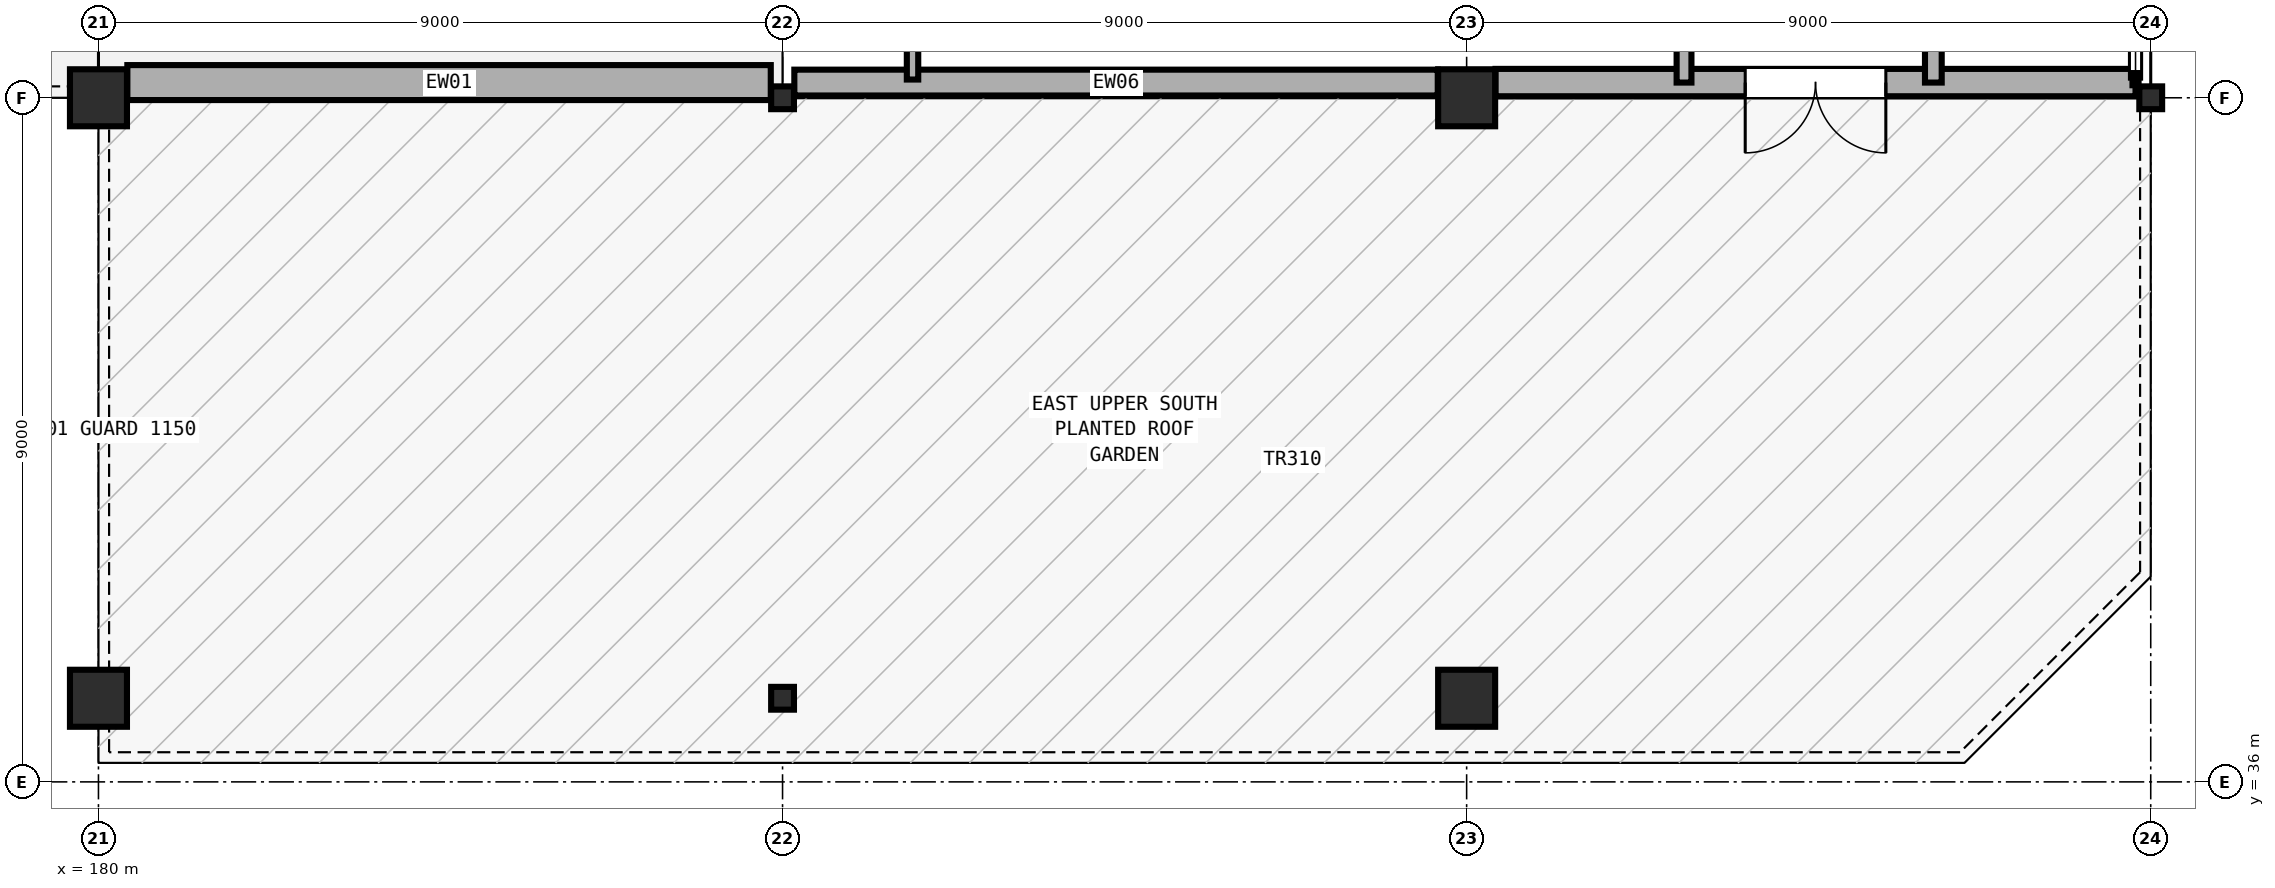
"""IFC4 building model, lengths in metres.
Left out: names, types, materials, properties, quantities, classifications, styles, units other than length and angle.
Written with IfcOpenShell. Run it as: python <this file> out.ifc"""

import sys

from ifc_helpers import new_model, si_unit, direction, frame, frame_2d, origin, origin_2d, place, context, subcontext, project, spatial, rectangle, hollow_rectangle, extrude, element, fill, save


model = new_model("IFC4")
c1 = context("Model", 3, precision=1e-05, world=origin(), true_north=direction((0.0, 1.0)))
c2 = subcontext(c1, "Body", "Model", "MODEL_VIEW")
j1 = project(units=[si_unit("LENGTHUNIT", "METRE"), si_unit("PLANEANGLEUNIT", "RADIAN")], contexts=[c1])
p1 = place(None, origin())
s1 = spatial("IfcSite", under=j1, at=p1, CompositionType="ELEMENT")
p2 = place(p1, origin())
s2 = spatial("IfcBuilding", under=s1, at=p2, CompositionType="ELEMENT")
p3 = place(p2, frame((0.0, 0.0, 19.2)))
s3 = spatial("IfcBuildingStorey", under=s2, at=p3, CompositionType="ELEMENT", Elevation=19.2)
for number, where, z_axis, x_axis in (
    (1, (180.0, 37.1, 0.0), (0.0, 0.0, 1.0), (1.0, 0.0, 0.0)),
    (2, (180.0, 45.0, 0.0), (0.0, 0.0, 1.0), (1.0, 0.0, 0.0)),
):
    element("IfcColumn", number, at=place(p3, frame(where, z_axis=z_axis, x_axis=x_axis)), inside=s3, PredefinedType="COLUMN", context=c2, shape_type="SweptSolid", body=[
        extrude(rectangle(XDim=0.75, YDim=0.75, at=origin_2d()), origin(), (0.0, 0.0, 1.0), 4.8),
    ])
for number, where, z_axis, x_axis in (
    (3, (189.0, 37.1, 0.0), (0.0, 0.0, 1.0), (1.0, 0.0, 0.0)),
    (4, (189.0, 45.0, 0.0), (0.0, 0.0, 1.0), (1.0, 0.0, 0.0)),
):
    element("IfcColumn", number, at=place(p3, frame(where, z_axis=z_axis, x_axis=x_axis)), inside=s3, PredefinedType="COLUMN", context=c2, shape_type="SweptSolid", body=[
        extrude(hollow_rectangle(XDim=0.3, YDim=0.3, WallThickness=0.012, at=origin_2d()), origin(), (0.0, 0.0, 1.0), 4.8),
    ])
for number, where, z_axis, x_axis in (
    (5, (198.0, 37.1, 0.0), (0.0, 0.0, 1.0), (1.0, 0.0, 0.0)),
    (6, (198.0, 45.0, 0.0), (0.0, 0.0, 1.0), (1.0, 0.0, 0.0)),
):
    element("IfcColumn", number, at=place(p3, frame(where, z_axis=z_axis, x_axis=x_axis)), inside=s3, PredefinedType="COLUMN", context=c2, shape_type="SweptSolid", body=[
        extrude(rectangle(XDim=0.75, YDim=0.75, at=origin_2d()), origin(), (0.0, 0.0, 1.0), 4.8),
    ])
p4 = place(p3, frame((207.0, 45.0, 0.0), z_axis=(0.0, 0.0, 1.0), x_axis=(1.0, 0.0, 0.0)))
e7 = element("IfcColumn", 7, at=p4, inside=s3, PredefinedType="COLUMN", context=c2, shape_type="SweptSolid", body=[
    extrude(hollow_rectangle(XDim=0.3, YDim=0.3, WallThickness=0.012, at=origin_2d()), origin(), (0.0, 0.0, 1.0), 4.8),
])
p5 = place(p3, frame((206.8, 45.2, 0.0), z_axis=(0.0, 0.0, 1.0), x_axis=(-1.0, 0.0, 0.0)))
e8 = element("IfcWall", 8, at=p5, inside=s3, PredefinedType="SOLIDWALL", context=c2, shape_type="SweptSolid", body=[
    extrude(rectangle(XDim=8.42, YDim=0.36, at=frame_2d((4.21, 0.0))), origin(), (0.0, 0.0, 1.0), 3.58),
])
p6 = place(p5, frame((3.285, 0.0, 0.0)))
e9 = element("IfcOpeningElement", 9, at=p6, cuts=e8, PredefinedType="OPENING", context=c2, shape_type="SweptSolid", body=[
    extrude(rectangle(XDim=1.85, YDim=2.25, at=frame_2d((0.925, 1.125))), frame((0.0, 0.19, 0.0), z_axis=(0.0, -1.0, 0.0), x_axis=(1.0, 0.0, 0.0)), (0.0, 0.0, 1.0), 0.38),
])
p7 = place(p3, frame((197.62, 45.2, 0.0), z_axis=(0.0, 0.0, 1.0), x_axis=(-1.0, 0.0, 0.0)))
e10 = element("IfcWall", 10, at=p7, inside=s3, PredefinedType="SOLIDWALL", context=c2, shape_type="SweptSolid", body=[
    extrude(rectangle(XDim=8.465, YDim=0.34, at=frame_2d((4.232, 0.0))), origin(), (0.0, 0.0, 1.0), 3.58),
])
p8 = place(p3, frame((188.845, 45.2, 0.0), z_axis=(0.0, 0.0, 1.0), x_axis=(-1.0, 0.0, 0.0)))
e11 = element("IfcWall", 11, at=p8, inside=s3, PredefinedType="SOLIDWALL", context=c2, shape_type="SweptSolid", body=[
    extrude(rectangle(XDim=8.465, YDim=0.46, at=frame_2d((4.232, 0.0))), origin(), (0.0, 0.0, 1.0), 3.28),
])
p9 = place(p3, frame((200.86, 45.2, 0.0), z_axis=(0.0, 0.0, 1.0), x_axis=(0.0, 1.0, 0.0)))
e12 = element("IfcWall", 12, at=p9, inside=s3, PredefinedType="PARTITIONING", context=c2, shape_type="SweptSolid", body=[
    extrude(rectangle(XDim=14.03, YDim=0.195, at=frame_2d((7.015, 0.0))), origin(), (0.0, 0.0, 1.0), 3.28),
])
p10 = place(p9, frame((6.465, 0.0, 0.0)))
e13 = element("IfcOpeningElement", 13, at=p10, cuts=e12, PredefinedType="OPENING", context=c2, shape_type="SweptSolid", body=[
    extrude(rectangle(XDim=1.1, YDim=2.1, at=frame_2d((0.55, 1.05))), frame((0.0, 0.107, 0.0), z_axis=(0.0, -1.0, 0.0), x_axis=(1.0, 0.0, 0.0)), (0.0, 0.0, 1.0), 0.215),
])
p11 = place(p3, frame((190.71, 45.24, 0.0), z_axis=(0.0, 0.0, 1.0), x_axis=(0.0, 1.0, 0.0)))
e14 = element("IfcWall", 14, at=p11, inside=s3, PredefinedType="PARTITIONING", context=c2, shape_type="SweptSolid", body=[
    extrude(rectangle(XDim=7.958, YDim=0.15, at=frame_2d((3.979, 0.0))), origin(), (0.0, 0.0, 1.0), 3.28),
])
p12 = place(p3, frame((204.14, 59.23, 0.0), z_axis=(0.0, 0.0, 1.0), x_axis=(0.0, -1.0, 0.0)))
e15 = element("IfcWall", 15, at=p12, inside=s3, PredefinedType="PARTITIONING", context=c2, shape_type="SweptSolid", body=[
    extrude(rectangle(XDim=14.03, YDim=0.22, at=frame_2d((7.015, 0.0))), origin(), (0.0, 0.0, 1.0), 3.28),
])
p13 = place(p12, frame((6.505, 0.0, 0.0)))
e16 = element("IfcOpeningElement", 16, at=p13, cuts=e15, PredefinedType="OPENING", context=c2, shape_type="SweptSolid", body=[
    extrude(rectangle(XDim=1.02, YDim=2.16, at=frame_2d((0.51, 1.08))), frame((0.0, 0.12, 0.0), z_axis=(0.0, -1.0, 0.0), x_axis=(1.0, 0.0, 0.0)), (0.0, 0.0, 1.0), 0.24),
])
p14 = place(p6, origin())
e17 = element("IfcDoor", 17, at=p14, inside=s3, OperationType="DOUBLE_DOOR_SINGLE_SWING", PredefinedType="DOOR", context=c2, shape_type="SweptSolid", body=[
    extrude(rectangle(XDim=1.85, YDim=2.25, at=frame_2d((0.925, 1.125))), frame((0.0, 0.025, 0.0), z_axis=(0.0, -1.0, 0.0), x_axis=(1.0, 0.0, 0.0)), (0.0, 0.0, 1.0), 0.05),
])
fill(e9, e17)
save(model, sys.argv[1])
